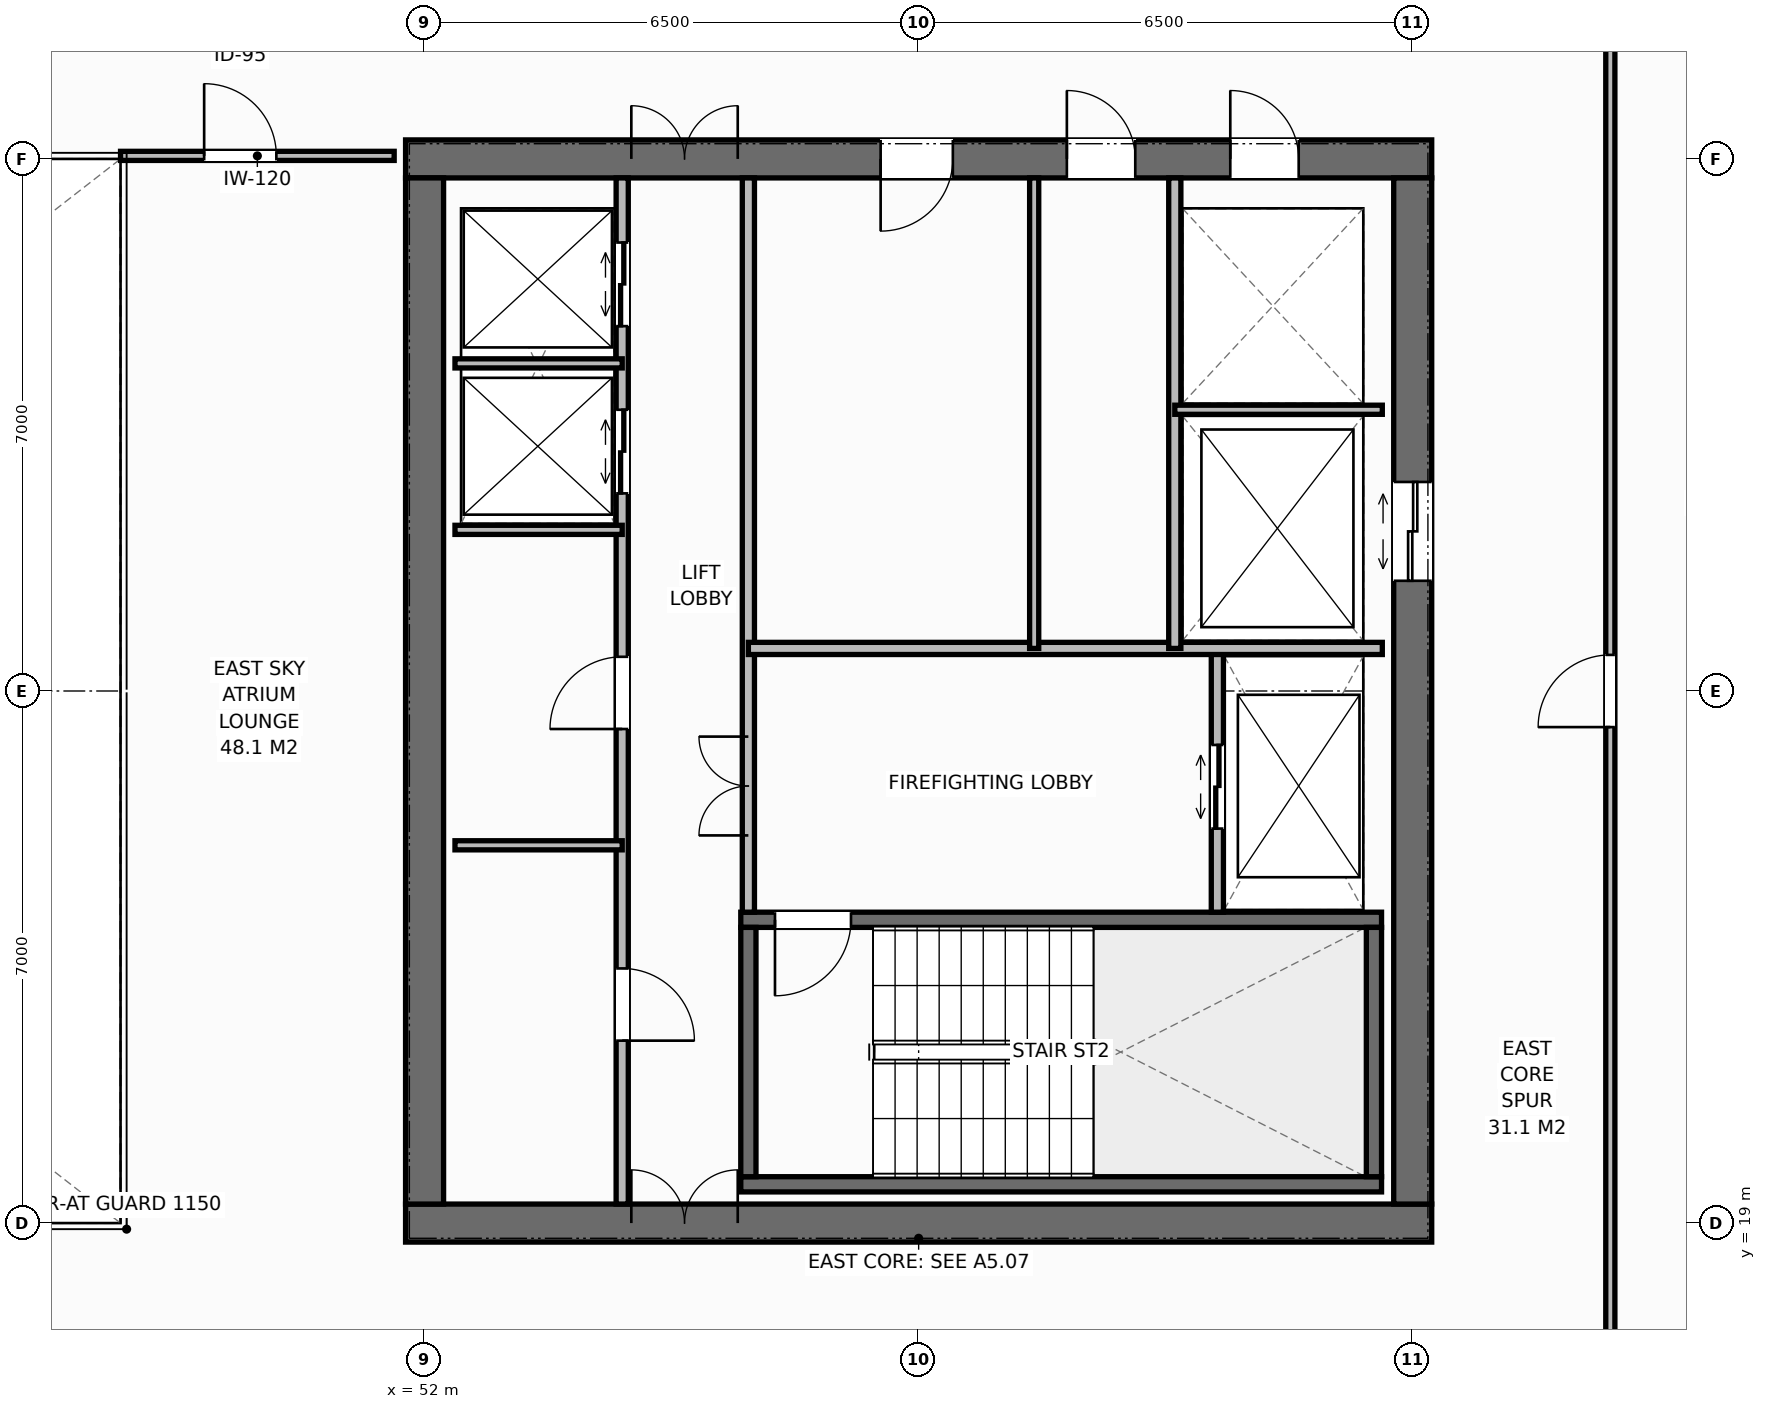
"""IFC4 building model, lengths in metres.
Left out: names, types, materials, properties, quantities, classifications, styles, units other than length and angle.
Written with IfcOpenShell. Run it as: python <this file> out.ifc"""

import sys

from ifc_helpers import new_model, si_unit, direction, frame, frame_2d, origin, place, context, subcontext, project, spatial, rectangle, extrude, element, fill, save


model = new_model("IFC4")
c1 = context("Model", 3, precision=1e-05, world=origin(), true_north=direction((0.0, 1.0)))
c2 = subcontext(c1, "Body", "Model", "MODEL_VIEW")
j1 = project(units=[si_unit("LENGTHUNIT", "METRE"), si_unit("PLANEANGLEUNIT", "RADIAN")], contexts=[c1])
p1 = place(None, origin())
s1 = spatial("IfcSite", under=j1, at=p1, CompositionType="ELEMENT")
p2 = place(p1, origin())
s2 = spatial("IfcBuilding", under=s1, at=p2, CompositionType="ELEMENT")
p3 = place(p2, frame((0.0, 0.0, 263.2)))
s3 = spatial("IfcBuildingStorey", under=s2, at=p3, CompositionType="ELEMENT", Elevation=263.2)
p4 = place(p3, frame((51.75, 19.0, 0.0), z_axis=(0.0, 0.0, 1.0), x_axis=(1.0, 0.0, 0.0)))
e1 = element("IfcWall", 1, at=p4, inside=s3, PredefinedType="SHEAR", context=c2, shape_type="SweptSolid", body=[
    extrude(rectangle(XDim=13.5, YDim=0.5, at=frame_2d((6.75, 0.0))), origin(), (0.0, 0.0, 1.0), 3.8),
])
p5 = place(p4, frame((2.97, 0.0, 0.0)))
e2 = element("IfcOpeningElement", 2, at=p5, cuts=e1, PredefinedType="OPENING", context=c2, shape_type="SweptSolid", body=[
    extrude(rectangle(XDim=1.4, YDim=2.2, at=frame_2d((0.7, 1.1))), frame((0.0, 0.26, 0.0), z_axis=(0.0, -1.0, 0.0), x_axis=(1.0, 0.0, 0.0)), (0.0, 0.0, 1.0), 0.52),
])
p6 = place(p3, frame((51.75, 33.0, 0.0), z_axis=(0.0, 0.0, 1.0), x_axis=(1.0, 0.0, 0.0)))
e3 = element("IfcWall", 3, at=p6, inside=s3, PredefinedType="SHEAR", context=c2, shape_type="SweptSolid", body=[
    extrude(rectangle(XDim=13.5, YDim=0.5, at=frame_2d((6.75, 0.0))), origin(), (0.0, 0.0, 1.0), 3.8),
])
p7 = place(p6, frame((2.97, 0.0, 0.0)))
e4 = element("IfcOpeningElement", 4, at=p7, cuts=e3, PredefinedType="OPENING", context=c2, shape_type="SweptSolid", body=[
    extrude(rectangle(XDim=1.4, YDim=2.2, at=frame_2d((0.7, 1.1))), frame((0.0, 0.26, 0.0), z_axis=(0.0, -1.0, 0.0), x_axis=(1.0, 0.0, 0.0)), (0.0, 0.0, 1.0), 0.52),
])
p8 = place(p6, frame((10.85, 0.0, 0.0)))
e5 = element("IfcOpeningElement", 5, at=p8, cuts=e3, PredefinedType="OPENING", context=c2, shape_type="SweptSolid", body=[
    extrude(rectangle(XDim=0.9, YDim=2.15, at=frame_2d((0.45, 1.075))), frame((0.0, 0.26, 0.0), z_axis=(0.0, -1.0, 0.0), x_axis=(1.0, 0.0, 0.0)), (0.0, 0.0, 1.0), 0.52),
])
p9 = place(p6, frame((6.25, 0.0, 0.0)))
e6 = element("IfcOpeningElement", 6, at=p9, cuts=e3, PredefinedType="OPENING", context=c2, shape_type="SweptSolid", body=[
    extrude(rectangle(XDim=0.95, YDim=2.15, at=frame_2d((0.475, 1.075))), frame((0.0, 0.26, 0.0), z_axis=(0.0, -1.0, 0.0), x_axis=(1.0, 0.0, 0.0)), (0.0, 0.0, 1.0), 0.52),
])
p10 = place(p6, frame((8.7, 0.0, 0.0)))
e7 = element("IfcOpeningElement", 7, at=p10, cuts=e3, PredefinedType="OPENING", context=c2, shape_type="SweptSolid", body=[
    extrude(rectangle(XDim=0.9, YDim=2.15, at=frame_2d((0.45, 1.075))), frame((0.0, 0.26, 0.0), z_axis=(0.0, -1.0, 0.0), x_axis=(1.0, 0.0, 0.0)), (0.0, 0.0, 1.0), 0.52),
])
p11 = place(p3, frame((52.0, 19.25, 0.0), z_axis=(0.0, 0.0, 1.0), x_axis=(0.0, 1.0, 0.0)))
e8 = element("IfcWall", 8, at=p11, inside=s3, PredefinedType="SHEAR", context=c2, shape_type="SweptSolid", body=[
    extrude(rectangle(XDim=13.5, YDim=0.5, at=frame_2d((6.75, 0.0))), origin(), (0.0, 0.0, 1.0), 3.8),
])
p12 = place(p3, frame((65.0, 19.25, 0.0), z_axis=(0.0, 0.0, 1.0), x_axis=(0.0, 1.0, 0.0)))
e9 = element("IfcWall", 9, at=p12, inside=s3, PredefinedType="SHEAR", context=c2, shape_type="SweptSolid", body=[
    extrude(rectangle(XDim=13.5, YDim=0.5, at=frame_2d((6.75, 0.0))), origin(), (0.0, 0.0, 1.0), 3.8),
])
p13 = place(p12, frame((8.2, 0.0, 0.0)))
e10 = element("IfcOpeningElement", 10, at=p13, cuts=e9, PredefinedType="OPENING", context=c2, shape_type="SweptSolid", body=[
    extrude(rectangle(XDim=1.3, YDim=2.2, at=frame_2d((0.65, 1.1))), frame((0.0, 0.26, 0.0), z_axis=(0.0, -1.0, 0.0), x_axis=(1.0, 0.0, 0.0)), (0.0, 0.0, 1.0), 0.52),
])
p14 = place(p3, frame((56.16, 19.51, 0.0), z_axis=(0.0, 0.0, 1.0), x_axis=(1.0, 0.0, 0.0)))
e11 = element("IfcWall", 11, at=p14, inside=s3, PredefinedType="SHEAR", context=c2, shape_type="SweptSolid", body=[
    extrude(rectangle(XDim=8.43, YDim=0.2, at=frame_2d((4.215, 0.0))), origin(), (0.0, 0.0, 1.0), 3.8),
])
p15 = place(p3, frame((56.16, 22.99, 0.0), z_axis=(0.0, 0.0, 1.0), x_axis=(1.0, 0.0, 0.0)))
e12 = element("IfcWall", 12, at=p15, inside=s3, PredefinedType="SHEAR", context=c2, shape_type="SweptSolid", body=[
    extrude(rectangle(XDim=8.43, YDim=0.2, at=frame_2d((4.215, 0.0))), origin(), (0.0, 0.0, 1.0), 3.8),
])
p16 = place(p15, frame((0.45, 0.0, 0.0)))
e13 = element("IfcOpeningElement", 13, at=p16, cuts=e12, PredefinedType="OPENING", context=c2, shape_type="SweptSolid", body=[
    extrude(rectangle(XDim=1.0, YDim=2.15, at=frame_2d((0.5, 1.075))), frame((0.0, 0.11, 0.0), z_axis=(0.0, -1.0, 0.0), x_axis=(1.0, 0.0, 0.0)), (0.0, 0.0, 1.0), 0.22),
])
for number, where, z_axis, x_axis in (
    (14, (56.26, 19.61, 0.0), (0.0, 0.0, 1.0), (0.0, 1.0, 0.0)),
    (15, (64.49, 19.61, 0.0), (0.0, 0.0, 1.0), (0.0, 1.0, 0.0)),
):
    element("IfcWall", number, at=place(p3, frame(where, z_axis=z_axis, x_axis=x_axis)), inside=s3, PredefinedType="SHEAR", context=c2, shape_type="SweptSolid", body=[
        extrude(rectangle(XDim=3.28, YDim=0.2, at=frame_2d((1.64, 0.0))), origin(), (0.0, 0.0, 1.0), 3.8),
    ])
p17 = place(p3, frame((54.6, 19.25, 0.0), z_axis=(0.0, 0.0, 1.0), x_axis=(0.0, 1.0, 0.0)))
e16 = element("IfcWall", 16, at=p17, inside=s3, PredefinedType="STANDARD", context=c2, shape_type="SweptSolid", body=[
    extrude(rectangle(XDim=13.5, YDim=0.16, at=frame_2d((6.75, 0.0))), origin(), (0.0, 0.0, 1.0), 3.588),
])
p18 = place(p17, frame((2.15, 0.0, 0.0)))
e17 = element("IfcOpeningElement", 17, at=p18, cuts=e16, PredefinedType="OPENING", context=c2, shape_type="SweptSolid", body=[
    extrude(rectangle(XDim=0.95, YDim=2.15, at=frame_2d((0.475, 1.075))), frame((0.0, 0.09, 0.0), z_axis=(0.0, -1.0, 0.0), x_axis=(1.0, 0.0, 0.0)), (0.0, 0.0, 1.0), 0.18),
])
p19 = place(p17, frame((6.25, 0.0, 0.0)))
e18 = element("IfcOpeningElement", 18, at=p19, cuts=e16, PredefinedType="OPENING", context=c2, shape_type="SweptSolid", body=[
    extrude(rectangle(XDim=0.95, YDim=2.15, at=frame_2d((0.475, 1.075))), frame((0.0, 0.09, 0.0), z_axis=(0.0, -1.0, 0.0), x_axis=(1.0, 0.0, 0.0)), (0.0, 0.0, 1.0), 0.18),
])
p20 = place(p17, frame((9.35, 0.0, 0.0)))
e19 = element("IfcOpeningElement", 19, at=p20, cuts=e16, PredefinedType="OPENING", context=c2, shape_type="SweptSolid", body=[
    extrude(rectangle(XDim=1.1, YDim=2.2, at=frame_2d((0.55, 1.1))), frame((0.0, 0.09, 0.0), z_axis=(0.0, -1.0, 0.0), x_axis=(1.0, 0.0, 0.0)), (0.0, 0.0, 1.0), 0.18),
])
p21 = place(p17, frame((11.55, 0.0, 0.0)))
e20 = element("IfcOpeningElement", 20, at=p21, cuts=e16, PredefinedType="OPENING", context=c2, shape_type="SweptSolid", body=[
    extrude(rectangle(XDim=1.1, YDim=2.2, at=frame_2d((0.55, 1.1))), frame((0.0, 0.09, 0.0), z_axis=(0.0, -1.0, 0.0), x_axis=(1.0, 0.0, 0.0)), (0.0, 0.0, 1.0), 0.18),
])
p22 = place(p3, frame((56.26, 23.09, 0.0), z_axis=(0.0, 0.0, 1.0), x_axis=(0.0, 1.0, 0.0)))
e21 = element("IfcWall", 21, at=p22, inside=s3, PredefinedType="STANDARD", context=c2, shape_type="SweptSolid", body=[
    extrude(rectangle(XDim=9.66, YDim=0.16, at=frame_2d((4.83, 0.0))), origin(), (0.0, 0.0, 1.0), 3.588),
])
p23 = place(p22, frame((1.01, 0.0, 0.0)))
e22 = element("IfcOpeningElement", 22, at=p23, cuts=e21, PredefinedType="OPENING", context=c2, shape_type="SweptSolid", body=[
    extrude(rectangle(XDim=1.3, YDim=2.2, at=frame_2d((0.65, 1.1))), frame((0.0, 0.09, 0.0), z_axis=(0.0, -1.0, 0.0), x_axis=(1.0, 0.0, 0.0)), (0.0, 0.0, 1.0), 0.18),
])
for number, where, z_axis, x_axis in (
    (23, (52.4, 23.97, 0.0), (0.0, 0.0, 1.0), (1.0, 0.0, 0.0)),
    (24, (52.4, 28.12, 0.0), (0.0, 0.0, 1.0), (1.0, 0.0, 0.0)),
    (25, (52.4, 30.31, 0.0), (0.0, 0.0, 1.0), (1.0, 0.0, 0.0)),
):
    element("IfcWall", number, at=place(p3, frame(where, z_axis=z_axis, x_axis=x_axis)), inside=s3, PredefinedType="PARTITIONING", context=c2, shape_type="SweptSolid", body=[
        extrude(rectangle(XDim=2.2, YDim=0.12, at=frame_2d((1.1, 0.0))), origin(), (0.0, 0.0, 1.0), 3.588),
    ])
p24 = place(p3, frame((62.43, 23.09, 0.0), z_axis=(0.0, 0.0, 1.0), x_axis=(0.0, 1.0, 0.0)))
e26 = element("IfcWall", 26, at=p24, inside=s3, PredefinedType="STANDARD", context=c2, shape_type="SweptSolid", body=[
    extrude(rectangle(XDim=3.47, YDim=0.16, at=frame_2d((1.735, 0.0))), origin(), (0.0, 0.0, 1.0), 3.588),
])
p25 = place(p24, frame((1.1, 0.0, 0.0)))
e27 = element("IfcOpeningElement", 27, at=p25, cuts=e26, PredefinedType="OPENING", context=c2, shape_type="SweptSolid", body=[
    extrude(rectangle(XDim=1.1, YDim=2.2, at=frame_2d((0.55, 1.1))), frame((0.0, 0.09, 0.0), z_axis=(0.0, -1.0, 0.0), x_axis=(1.0, 0.0, 0.0)), (0.0, 0.0, 1.0), 0.18),
])
p26 = place(p3, frame((56.26, 26.56, 0.0), z_axis=(0.0, 0.0, 1.0), x_axis=(1.0, 0.0, 0.0)))
e28 = element("IfcWall", 28, at=p26, inside=s3, PredefinedType="STANDARD", context=c2, shape_type="SweptSolid", body=[
    extrude(rectangle(XDim=8.34, YDim=0.16, at=frame_2d((4.17, 0.0))), origin(), (0.0, 0.0, 1.0), 3.588),
])
p27 = place(p3, frame((61.87, 26.56, 0.0), z_axis=(0.0, 0.0, 1.0), x_axis=(0.0, 1.0, 0.0)))
e29 = element("IfcWall", 29, at=p27, inside=s3, PredefinedType="STANDARD", context=c2, shape_type="SweptSolid", body=[
    extrude(rectangle(XDim=6.19, YDim=0.16, at=frame_2d((3.095, 0.0))), origin(), (0.0, 0.0, 1.0), 3.588),
])
p28 = place(p3, frame((61.87, 29.7, 0.0), z_axis=(0.0, 0.0, 1.0), x_axis=(1.0, 0.0, 0.0)))
e30 = element("IfcWall", 30, at=p28, inside=s3, PredefinedType="PARTITIONING", context=c2, shape_type="SweptSolid", body=[
    extrude(rectangle(XDim=2.73, YDim=0.12, at=frame_2d((1.365, 0.0))), origin(), (0.0, 0.0, 1.0), 3.588),
])
p29 = place(p3, frame((60.02, 26.56, 0.0), z_axis=(0.0, 0.0, 1.0), x_axis=(0.0, 1.0, 0.0)))
e31 = element("IfcWall", 31, at=p29, inside=s3, PredefinedType="PARTITIONING", context=c2, shape_type="SweptSolid", body=[
    extrude(rectangle(XDim=6.19, YDim=0.12, at=frame_2d((3.095, 0.0))), origin(), (0.0, 0.0, 1.0), 3.588),
])
p30 = place(p3, frame((48.0, 33.04, 0.0), z_axis=(0.0, 0.0, 1.0), x_axis=(1.0, 0.0, 0.0)))
e32 = element("IfcWall", 32, at=p30, inside=s3, PredefinedType="PARTITIONING", context=c2, shape_type="SweptSolid", body=[
    extrude(rectangle(XDim=3.6, YDim=0.12, at=frame_2d((1.8, 0.0))), origin(), (0.0, 0.0, 1.0), 3.328),
])
p31 = place(p30, frame((1.1, 0.0, 0.0)))
e33 = element("IfcOpeningElement", 33, at=p31, cuts=e32, PredefinedType="OPENING", context=c2, shape_type="SweptSolid", body=[
    extrude(rectangle(XDim=0.95, YDim=2.15, at=frame_2d((0.475, 1.075))), frame((0.0, 0.07, 0.0), z_axis=(0.0, -1.0, 0.0), x_axis=(1.0, 0.0, 0.0)), (0.0, 0.0, 1.0), 0.14),
])
p32 = place(p3, frame((67.6, 16.5, 0.0), z_axis=(0.0, 0.0, 1.0), x_axis=(0.0, 1.0, 0.0)))
e34 = element("IfcWall", 34, at=p32, inside=s3, PredefinedType="PARTITIONING", context=c2, shape_type="SweptSolid", body=[
    extrude(rectangle(XDim=19.0, YDim=0.12, at=frame_2d((9.5, 0.0))), origin(), (0.0, 0.0, 1.0), 3.588),
])
p33 = place(p32, frame((9.025, 0.0, 0.0)))
e35 = element("IfcOpeningElement", 35, at=p33, cuts=e34, PredefinedType="OPENING", context=c2, shape_type="SweptSolid", body=[
    extrude(rectangle(XDim=0.95, YDim=2.15, at=frame_2d((0.475, 1.075))), frame((0.0, 0.07, 0.0), z_axis=(0.0, -1.0, 0.0), x_axis=(1.0, 0.0, 0.0)), (0.0, 0.0, 1.0), 0.14),
])
p34 = place(p5, origin())
e36 = element("IfcDoor", 36, at=p34, inside=s3, OperationType="DOUBLE_DOOR_SINGLE_SWING", PredefinedType="DOOR", context=c2, shape_type="SweptSolid", body=[
    extrude(rectangle(XDim=1.4, YDim=2.2, at=frame_2d((0.7, 1.1))), frame((0.0, 0.075, 0.0), z_axis=(0.0, -1.0, 0.0), x_axis=(1.0, 0.0, 0.0)), (0.0, 0.0, 1.0), 0.05),
])
fill(e2, e36)
p35 = place(p7, origin())
e37 = element("IfcDoor", 37, at=p35, inside=s3, OperationType="DOUBLE_DOOR_SINGLE_SWING", PredefinedType="DOOR", context=c2, shape_type="SweptSolid", body=[
    extrude(rectangle(XDim=1.4, YDim=2.2, at=frame_2d((0.7, 1.1))), frame((0.0, -0.025, 0.0), z_axis=(0.0, -1.0, 0.0), x_axis=(1.0, 0.0, 0.0)), (0.0, 0.0, 1.0), 0.05),
])
fill(e4, e37)
p36 = place(p18, origin())
e38 = element("IfcDoor", 38, at=p36, inside=s3, OperationType="SINGLE_SWING_RIGHT", PredefinedType="DOOR", context=c2, shape_type="SweptSolid", body=[
    extrude(rectangle(XDim=0.95, YDim=2.15, at=frame_2d((0.475, 1.075))), frame((0.0, 0.025, 0.0), z_axis=(0.0, -1.0, 0.0), x_axis=(1.0, 0.0, 0.0)), (0.0, 0.0, 1.0), 0.05),
])
fill(e17, e38)
p37 = place(p19, origin())
e39 = element("IfcDoor", 39, at=p37, inside=s3, OperationType="SINGLE_SWING_LEFT", PredefinedType="DOOR", context=c2, shape_type="SweptSolid", body=[
    extrude(rectangle(XDim=0.95, YDim=2.15, at=frame_2d((0.475, 1.075))), frame((0.0, 0.025, 0.0), z_axis=(0.0, -1.0, 0.0), x_axis=(1.0, 0.0, 0.0)), (0.0, 0.0, 1.0), 0.05),
])
fill(e18, e39)
p38 = place(p20, origin())
e40 = element("IfcDoor", 40, at=p38, inside=s3, OperationType="DOUBLE_DOOR_SLIDING", PredefinedType="DOOR", context=c2, shape_type="SweptSolid", body=[
    extrude(rectangle(XDim=1.1, YDim=2.2, at=frame_2d((0.55, 1.1))), frame((0.0, 0.025, 0.0), z_axis=(0.0, -1.0, 0.0), x_axis=(1.0, 0.0, 0.0)), (0.0, 0.0, 1.0), 0.05),
])
fill(e19, e40)
p39 = place(p21, origin())
e41 = element("IfcDoor", 41, at=p39, inside=s3, OperationType="DOUBLE_DOOR_SLIDING", PredefinedType="DOOR", context=c2, shape_type="SweptSolid", body=[
    extrude(rectangle(XDim=1.1, YDim=2.2, at=frame_2d((0.55, 1.1))), frame((0.0, 0.025, 0.0), z_axis=(0.0, -1.0, 0.0), x_axis=(1.0, 0.0, 0.0)), (0.0, 0.0, 1.0), 0.05),
])
fill(e20, e41)
p40 = place(p16, origin())
e42 = element("IfcDoor", 42, at=p40, inside=s3, OperationType="SINGLE_SWING_RIGHT", PredefinedType="DOOR", context=c2, shape_type="SweptSolid", body=[
    extrude(rectangle(XDim=1.0, YDim=2.15, at=frame_2d((0.5, 1.075))), frame((0.0, 0.025, 0.0), z_axis=(0.0, -1.0, 0.0), x_axis=(1.0, 0.0, 0.0)), (0.0, 0.0, 1.0), 0.05),
])
fill(e13, e42)
p41 = place(p25, origin())
e43 = element("IfcDoor", 43, at=p41, inside=s3, OperationType="DOUBLE_DOOR_SLIDING", PredefinedType="DOOR", context=c2, shape_type="SweptSolid", body=[
    extrude(rectangle(XDim=1.1, YDim=2.2, at=frame_2d((0.55, 1.1))), frame((0.0, 0.025, 0.0), z_axis=(0.0, -1.0, 0.0), x_axis=(1.0, 0.0, 0.0)), (0.0, 0.0, 1.0), 0.05),
])
fill(e27, e43)
p42 = place(p23, origin())
e44 = element("IfcDoor", 44, at=p42, inside=s3, OperationType="DOUBLE_DOOR_SINGLE_SWING", PredefinedType="DOOR", context=c2, shape_type="SweptSolid", body=[
    extrude(rectangle(XDim=1.3, YDim=2.2, at=frame_2d((0.65, 1.1))), frame((0.0, 0.025, 0.0), z_axis=(0.0, -1.0, 0.0), x_axis=(1.0, 0.0, 0.0)), (0.0, 0.0, 1.0), 0.05),
])
fill(e22, e44)
p43 = place(p13, origin())
e45 = element("IfcDoor", 45, at=p43, inside=s3, OperationType="DOUBLE_DOOR_SLIDING", PredefinedType="DOOR", context=c2, shape_type="SweptSolid", body=[
    extrude(rectangle(XDim=1.3, YDim=2.2, at=frame_2d((0.65, 1.1))), frame((0.0, 0.025, 0.0), z_axis=(0.0, -1.0, 0.0), x_axis=(1.0, 0.0, 0.0)), (0.0, 0.0, 1.0), 0.05),
])
fill(e10, e45)
p44 = place(p8, origin())
e46 = element("IfcDoor", 46, at=p44, inside=s3, OperationType="SINGLE_SWING_LEFT", PredefinedType="DOOR", context=c2, shape_type="SweptSolid", body=[
    extrude(rectangle(XDim=0.9, YDim=2.15, at=frame_2d((0.45, 1.075))), frame((0.0, -0.025, 0.0), z_axis=(0.0, -1.0, 0.0), x_axis=(1.0, 0.0, 0.0)), (0.0, 0.0, 1.0), 0.05),
])
fill(e5, e46)
p45 = place(p9, origin())
e47 = element("IfcDoor", 47, at=p45, inside=s3, OperationType="SINGLE_SWING_RIGHT", PredefinedType="DOOR", context=c2, shape_type="SweptSolid", body=[
    extrude(rectangle(XDim=0.95, YDim=2.15, at=frame_2d((0.475, 1.075))), frame((0.0, -0.025, 0.0), z_axis=(0.0, -1.0, 0.0), x_axis=(1.0, 0.0, 0.0)), (0.0, 0.0, 1.0), 0.05),
])
fill(e6, e47)
p46 = place(p10, origin())
e48 = element("IfcDoor", 48, at=p46, inside=s3, OperationType="SINGLE_SWING_LEFT", PredefinedType="DOOR", context=c2, shape_type="SweptSolid", body=[
    extrude(rectangle(XDim=0.9, YDim=2.15, at=frame_2d((0.45, 1.075))), frame((0.0, -0.025, 0.0), z_axis=(0.0, -1.0, 0.0), x_axis=(1.0, 0.0, 0.0)), (0.0, 0.0, 1.0), 0.05),
])
fill(e7, e48)
p47 = place(p31, origin())
e49 = element("IfcDoor", 49, at=p47, inside=s3, OperationType="SINGLE_SWING_LEFT", PredefinedType="DOOR", context=c2, shape_type="SweptSolid", body=[
    extrude(rectangle(XDim=0.95, YDim=2.15, at=frame_2d((0.475, 1.075))), frame((0.0, 0.025, 0.0), z_axis=(0.0, -1.0, 0.0), x_axis=(1.0, 0.0, 0.0)), (0.0, 0.0, 1.0), 0.05),
])
fill(e33, e49)
p48 = place(p33, origin())
e50 = element("IfcDoor", 50, at=p48, inside=s3, OperationType="SINGLE_SWING_LEFT", PredefinedType="DOOR", context=c2, shape_type="SweptSolid", body=[
    extrude(rectangle(XDim=0.95, YDim=2.15, at=frame_2d((0.475, 1.075))), frame((0.0, 0.025, 0.0), z_axis=(0.0, -1.0, 0.0), x_axis=(1.0, 0.0, 0.0)), (0.0, 0.0, 1.0), 0.05),
])
fill(e35, e50)
save(model, sys.argv[1])
